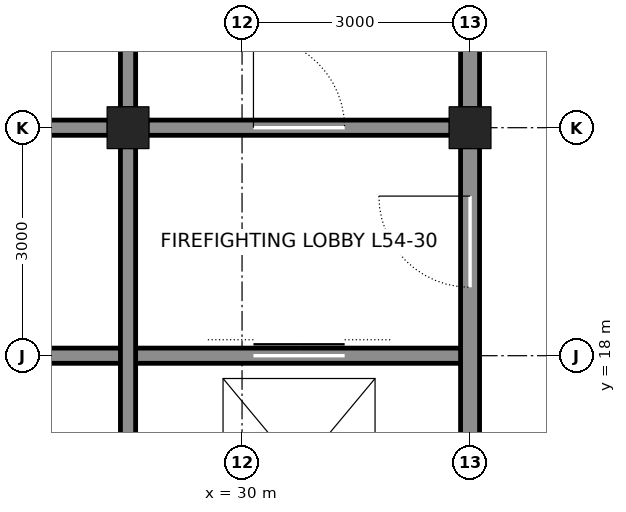
"""IFC4 building model, lengths in metres.
Left out: names, types, materials, properties, quantities, classifications, styles, units other than length and angle.
Written with IfcOpenShell. Run it as: python <this file> out.ifc"""

import sys

from ifc_helpers import new_model, si_unit, direction, frame, frame_2d, origin, origin_2d, place, context, subcontext, project, spatial, rectangle, hollow_rectangle, extrude, element, fill, save


model = new_model("IFC4")
c1 = context("Model", 3, precision=1e-05, world=origin(), true_north=direction((0.0, 1.0)))
c2 = subcontext(c1, "Body", "Model", "MODEL_VIEW")
j1 = project(units=[si_unit("LENGTHUNIT", "METRE"), si_unit("PLANEANGLEUNIT", "RADIAN")], contexts=[c1])
p1 = place(None, origin())
s1 = spatial("IfcSite", under=j1, at=p1, CompositionType="ELEMENT")
p2 = place(p1, origin())
s2 = spatial("IfcBuilding", under=s1, at=p2, CompositionType="ELEMENT")
p3 = place(p2, frame((0.0, 0.0, 243.3)))
s3 = spatial("IfcBuildingStorey", under=s2, at=p3, CompositionType="ELEMENT", Elevation=243.3)
for number, where, z_axis, x_axis in (
    (1, (33.0, 21.0, 0.0), (0.0, 0.0, 1.0), (1.0, 0.0, 0.0)),
    (2, (28.5, 21.0, 0.0), (0.0, 0.0, 1.0), (1.0, 0.0, 0.0)),
):
    element("IfcColumn", number, at=place(p3, frame(where, z_axis=z_axis, x_axis=x_axis)), inside=s3, PredefinedType="COLUMN", context=c2, shape_type="SweptSolid", body=[
        extrude(hollow_rectangle(XDim=0.55, YDim=0.55, WallThickness=0.045, at=origin_2d()), origin(), (0.0, 0.0, 1.0), 4.2),
    ])
p4 = place(p3, frame((25.5, 18.0, 0.0), z_axis=(0.0, 0.0, 1.0), x_axis=(1.0, 0.0, 0.0)))
e3 = element("IfcWall", 3, at=p4, inside=s3, PredefinedType="SOLIDWALL", context=c2, shape_type="SweptSolid", body=[
    extrude(rectangle(XDim=7.5, YDim=0.2, at=frame_2d((3.75, 0.0))), origin(), (0.0, 0.0, 1.0), 4.04),
])
p5 = place(p4, frame((4.65, 0.0, 0.0)))
e4 = element("IfcOpeningElement", 4, at=p5, cuts=e3, PredefinedType="OPENING", context=c2, shape_type="SweptSolid", body=[
    extrude(rectangle(XDim=1.2, YDim=2.1, at=frame_2d((0.6, 1.05))), frame((0.0, 0.11, 0.0), z_axis=(0.0, -1.0, 0.0), x_axis=(1.0, 0.0, 0.0)), (0.0, 0.0, 1.0), 0.22),
])
p6 = place(p3, frame((25.5, 21.0, 0.0), z_axis=(0.0, 0.0, 1.0), x_axis=(1.0, 0.0, 0.0)))
e5 = element("IfcWall", 5, at=p6, inside=s3, PredefinedType="SOLIDWALL", context=c2, shape_type="SweptSolid", body=[
    extrude(rectangle(XDim=2.75, YDim=0.2, at=frame_2d((1.375, 0.0))), origin(), (0.0, 0.0, 1.0), 3.09),
])
p7 = place(p3, frame((28.75, 21.0, 0.0), z_axis=(0.0, 0.0, 1.0), x_axis=(1.0, 0.0, 0.0)))
e6 = element("IfcWall", 6, at=p7, inside=s3, PredefinedType="SOLIDWALL", context=c2, shape_type="SweptSolid", body=[
    extrude(rectangle(XDim=4.0, YDim=0.2, at=frame_2d((2.0, 0.0))), origin(), (0.0, 0.0, 1.0), 3.09),
])
p8 = place(p7, frame((1.4, 0.0, 0.0)))
e7 = element("IfcOpeningElement", 7, at=p8, cuts=e6, PredefinedType="OPENING", context=c2, shape_type="SweptSolid", body=[
    extrude(rectangle(XDim=1.2, YDim=2.1, at=frame_2d((0.6, 1.05))), frame((0.0, 0.11, 0.0), z_axis=(0.0, -1.0, 0.0), x_axis=(1.0, 0.0, 0.0)), (0.0, 0.0, 1.0), 0.22),
])
p9 = place(p3, frame((28.5, 12.25, 0.0), z_axis=(0.0, 0.0, 1.0), x_axis=(0.0, 1.0, 0.0)))
e8 = element("IfcWall", 8, at=p9, inside=s3, PredefinedType="SOLIDWALL", context=c2, shape_type="SweptSolid", body=[
    extrude(rectangle(XDim=8.5, YDim=0.2, at=frame_2d((4.25, 0.0))), origin(), (0.0, 0.0, 1.0), 3.113),
])
p10 = place(p3, frame((28.5, 21.25, 0.0), z_axis=(0.0, 0.0, 1.0), x_axis=(0.0, 1.0, 0.0)))
e9 = element("IfcWall", 9, at=p10, inside=s3, PredefinedType="SOLIDWALL", context=c2, shape_type="SweptSolid", body=[
    extrude(rectangle(XDim=2.5, YDim=0.2, at=frame_2d((1.25, 0.0))), origin(), (0.0, 0.0, 1.0), 3.113),
])
p11 = place(p3, frame((33.0, 12.25, 0.0), z_axis=(0.0, 0.0, 1.0), x_axis=(0.0, 1.0, 0.0)))
e10 = element("IfcWall", 10, at=p11, inside=s3, PredefinedType="SOLIDWALL", context=c2, shape_type="SweptSolid", body=[
    extrude(rectangle(XDim=8.5, YDim=0.25, at=frame_2d((4.25, 0.0))), origin(), (0.0, 0.0, 1.0), 3.113),
])
p12 = place(p11, frame((6.65, 0.0, 0.0)))
e11 = element("IfcOpeningElement", 11, at=p12, cuts=e10, PredefinedType="OPENING", context=c2, shape_type="SweptSolid", body=[
    extrude(rectangle(XDim=1.2, YDim=2.1, at=frame_2d((0.6, 1.05))), frame((0.0, 0.135, 0.0), z_axis=(0.0, -1.0, 0.0), x_axis=(1.0, 0.0, 0.0)), (0.0, 0.0, 1.0), 0.27),
])
p13 = place(p11, frame((0.875, 0.0, 0.0)))
e12 = element("IfcOpeningElement", 12, at=p13, cuts=e10, PredefinedType="OPENING", context=c2, shape_type="SweptSolid", body=[
    extrude(rectangle(XDim=0.75, YDim=2.1, at=frame_2d((0.375, 1.05))), frame((0.0, 0.135, 0.0), z_axis=(0.0, -1.0, 0.0), x_axis=(1.0, 0.0, 0.0)), (0.0, 0.0, 1.0), 0.27),
])
p14 = place(p3, frame((33.0, 21.25, 0.0), z_axis=(0.0, 0.0, 1.0), x_axis=(0.0, 1.0, 0.0)))
e13 = element("IfcWall", 13, at=p14, inside=s3, PredefinedType="SOLIDWALL", context=c2, shape_type="SweptSolid", body=[
    extrude(rectangle(XDim=2.5, YDim=0.25, at=frame_2d((1.25, 0.0))), origin(), (0.0, 0.0, 1.0), 3.113),
])
p15 = place(p8, origin())
e14 = element("IfcDoor", 14, at=p15, inside=s3, OperationType="SINGLE_SWING_LEFT", PredefinedType="DOOR", context=c2, shape_type="SweptSolid", body=[
    extrude(rectangle(XDim=1.2, YDim=2.1, at=frame_2d((0.6, 1.05))), frame((0.0, 0.025, 0.0), z_axis=(0.0, -1.0, 0.0), x_axis=(1.0, 0.0, 0.0)), (0.0, 0.0, 1.0), 0.05),
])
fill(e7, e14)
p16 = place(p12, origin())
e15 = element("IfcDoor", 15, at=p16, inside=s3, OperationType="SINGLE_SWING_RIGHT", PredefinedType="DOOR", context=c2, shape_type="SweptSolid", body=[
    extrude(rectangle(XDim=1.2, YDim=2.1, at=frame_2d((0.6, 1.05))), frame((0.0, 0.025, 0.0), z_axis=(0.0, -1.0, 0.0), x_axis=(1.0, 0.0, 0.0)), (0.0, 0.0, 1.0), 0.05),
])
fill(e11, e15)
p17 = place(p5, origin())
e16 = element("IfcDoor", 16, at=p17, inside=s3, OperationType="DOUBLE_DOOR_SLIDING", PredefinedType="DOOR", context=c2, shape_type="SweptSolid", body=[
    extrude(rectangle(XDim=1.2, YDim=2.1, at=frame_2d((0.6, 1.05))), frame((0.0, 0.025, 0.0), z_axis=(0.0, -1.0, 0.0), x_axis=(1.0, 0.0, 0.0)), (0.0, 0.0, 1.0), 0.05),
])
fill(e4, e16)
save(model, sys.argv[1])
